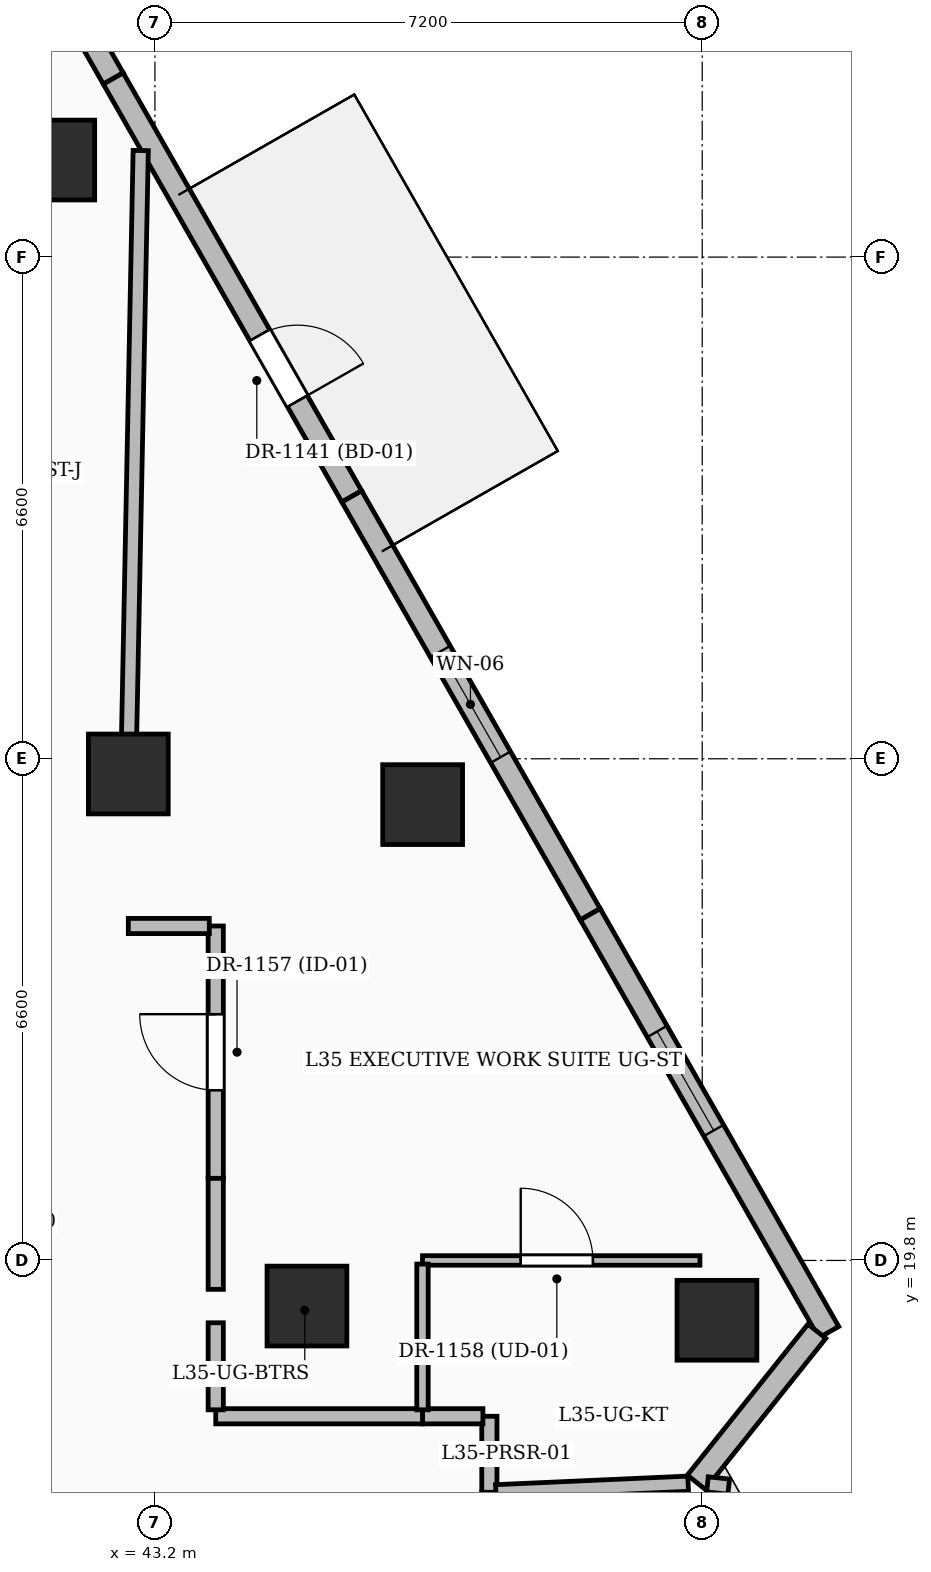
"""IFC4 building model, lengths in metres.
Left out: names, types, materials, properties, quantities, classifications, styles, units other than length and angle.
Written with IfcOpenShell. Run it as: python <this file> out.ifc"""

import sys

from ifc_helpers import new_model, si_unit, direction, frame, frame_2d, origin, origin_2d, place, context, subcontext, project, spatial, rectangle, extrude, element, fill, save


model = new_model("IFC4")
c1 = context("Model", 3, precision=1e-05, world=origin(), true_north=direction((0.0, 1.0)))
c2 = subcontext(c1, "Body", "Model", "MODEL_VIEW")
j1 = project(units=[si_unit("LENGTHUNIT", "METRE"), si_unit("PLANEANGLEUNIT", "RADIAN")], contexts=[c1])
p1 = place(None, origin())
s1 = spatial("IfcSite", under=j1, at=p1, CompositionType="ELEMENT")
p2 = place(p1, origin())
s2 = spatial("IfcBuilding", under=s1, at=p2, CompositionType="ELEMENT")
p3 = place(p2, frame((0.0, 0.0, 139.2)))
s3 = spatial("IfcBuildingStorey", under=s2, at=p3, CompositionType="ELEMENT", Elevation=139.2)
for number, where, z_axis, x_axis in (
    (1, (45.2, 19.2, 0.0), (0.0, 0.0, 1.0), (1.0, 0.0, 0.0)),
    (2, (42.85, 26.2, 0.0), (0.0, 0.0, 1.0), (1.0, 0.0, 0.0)),
    (3, (50.594, 19.013, 0.0), (0.0, 0.0, 1.0), (1.0, 0.0, 0.0)),
    (4, (46.722, 25.797, 0.0), (0.0, 0.0, 1.0), (1.0, 0.0, 0.0)),
    (5, (41.882, 34.277, 0.0), (0.0, 0.0, 1.0), (1.0, 0.0, 0.0)),
):
    element("IfcColumn", number, at=place(p3, frame(where, z_axis=z_axis, x_axis=x_axis)), inside=s3, PredefinedType="COLUMN", context=c2, shape_type="SweptSolid", body=[
        extrude(rectangle(XDim=1.05, YDim=1.05, at=origin_2d()), origin(), (0.0, 0.0, 1.0), 3.6),
    ])
p4 = place(p3, frame((39.801, 40.344, 0.0), z_axis=(0.0, 0.0, 1.0), x_axis=(0.495718237465, -0.868483407467, 0.0)))
e6 = element("IfcWall", 6, at=p4, inside=s3, PredefinedType="SOLIDWALL", context=c2, shape_type="SweptSolid", body=[
    extrude(rectangle(XDim=5.75, YDim=0.3, at=frame_2d((2.875, 0.0))), origin(), (0.0, 0.0, 1.0), 3.35),
])
p5 = place(p4, frame((2.52, 0.0, 0.55)))
e7 = element("IfcOpeningElement", 7, at=p5, cuts=e6, PredefinedType="OPENING", context=c2, shape_type="SweptSolid", body=[
    extrude(rectangle(XDim=2.1, YDim=2.4, at=frame_2d((1.05, 1.2))), frame((0.0, 0.16, 0.0), z_axis=(0.0, -1.0, 0.0), x_axis=(1.0, 0.0, 0.0)), (0.0, 0.0, 1.0), 0.32),
])
p6 = place(p3, frame((42.652, 35.35, 0.0), z_axis=(0.0, 0.0, 1.0), x_axis=(0.495702771017, -0.868492235317, 0.0)))
e8 = element("IfcWall", 8, at=p6, inside=s3, PredefinedType="SOLIDWALL", context=c2, shape_type="SweptSolid", body=[
    extrude(rectangle(XDim=6.33, YDim=0.3, at=frame_2d((3.165, 0.0))), origin(), (0.0, 0.0, 1.0), 3.35),
])
p7 = place(p6, frame((3.888, 0.0, 0.0)))
e9 = element("IfcOpeningElement", 9, at=p7, cuts=e8, PredefinedType="OPENING", context=c2, shape_type="SweptSolid", body=[
    extrude(rectangle(XDim=1.0, YDim=2.2, at=frame_2d((0.5, 1.1))), frame((0.0, 0.16, 0.0), z_axis=(0.0, -1.0, 0.0), x_axis=(1.0, 0.0, 0.0)), (0.0, 0.0, 1.0), 0.32),
])
p8 = place(p3, frame((45.79, 29.852, 0.0), z_axis=(0.0, 0.0, 1.0), x_axis=(0.495702771017, -0.868492235317, 0.0)))
e10 = element("IfcWall", 10, at=p8, inside=s3, PredefinedType="SOLIDWALL", context=c2, shape_type="SweptSolid", body=[
    extrude(rectangle(XDim=6.33, YDim=0.3, at=frame_2d((3.165, 0.0))), origin(), (0.0, 0.0, 1.0), 3.35),
])
p9 = place(p8, frame((2.35, 0.0, 0.55)))
e11 = element("IfcOpeningElement", 11, at=p9, cuts=e10, PredefinedType="OPENING", context=c2, shape_type="SweptSolid", body=[
    extrude(rectangle(XDim=1.6, YDim=2.2, at=frame_2d((0.8, 1.1))), frame((0.0, 0.16, 0.0), z_axis=(0.0, -1.0, 0.0), x_axis=(1.0, 0.0, 0.0)), (0.0, 0.0, 1.0), 0.32),
])
p10 = place(p3, frame((48.927, 24.354, 0.0), z_axis=(0.0, 0.0, 1.0), x_axis=(0.495702771017, -0.868492235317, 0.0)))
e12 = element("IfcWall", 12, at=p10, inside=s3, PredefinedType="SOLIDWALL", context=c2, shape_type="SweptSolid", body=[
    extrude(rectangle(XDim=6.33, YDim=0.3, at=frame_2d((3.165, 0.0))), origin(), (0.0, 0.0, 1.0), 3.35),
])
p11 = place(p10, frame((1.775, 0.0, 0.6)))
e13 = element("IfcOpeningElement", 13, at=p11, cuts=e12, PredefinedType="OPENING", context=c2, shape_type="SweptSolid", body=[
    extrude(rectangle(XDim=1.5, YDim=2.1, at=frame_2d((0.75, 1.05))), frame((0.0, 0.16, 0.0), z_axis=(0.0, -1.0, 0.0), x_axis=(1.0, 0.0, 0.0)), (0.0, 0.0, 1.0), 0.32),
])
p12 = place(p3, frame((51.909, 18.869, 0.0), z_axis=(0.0, 0.0, 1.0), x_axis=(-0.624062389724, -0.781374515666, 0.0)))
e14 = element("IfcWall", 14, at=p12, inside=s3, PredefinedType="SOLIDWALL", context=c2, shape_type="SweptSolid", body=[
    extrude(rectangle(XDim=2.542, YDim=0.3, at=frame_2d((1.271, 0.0))), origin(), (0.0, 0.0, 1.0), 2.575),
])
p13 = place(p3, frame((47.425, 14.2, 0.0), z_axis=(0.0, 0.0, 1.0), x_axis=(0.068484119878, 0.997652206595, 0.0)))
e15 = element("IfcWall", 15, at=p13, inside=s3, PredefinedType="PARTITIONING", context=c2, shape_type="SweptSolid", body=[
    extrude(rectangle(XDim=2.556, YDim=0.2, at=frame_2d((1.278, 0.0))), origin(), (0.0, 0.0, 1.0), 2.393),
])
p14 = place(p13, frame((1.172, 0.0, 0.0)))
e16 = element("IfcOpeningElement", 16, at=p14, cuts=e15, PredefinedType="OPENING", context=c2, shape_type="SweptSolid", body=[
    extrude(rectangle(XDim=0.9, YDim=2.1, at=frame_2d((0.45, 1.05))), frame((0.0, 0.11, 0.0), z_axis=(0.0, -1.0, 0.0), x_axis=(1.0, 0.0, 0.0)), (0.0, 0.0, 1.0), 0.22),
])
p15 = place(p3, frame((44.0, 20.88, 0.0), z_axis=(0.0, 0.0, 1.0), x_axis=(0.0, 1.0, 0.0)))
e17 = element("IfcWall", 17, at=p15, inside=s3, PredefinedType="PARTITIONING", context=c2, shape_type="SweptSolid", body=[
    extrude(rectangle(XDim=3.32, YDim=0.2, at=frame_2d((1.66, 0.0))), origin(), (0.0, 0.0, 1.0), 2.436),
])
p16 = place(p15, frame((1.16, 0.0, 0.0)))
e18 = element("IfcOpeningElement", 18, at=p16, cuts=e17, PredefinedType="OPENING", context=c2, shape_type="SweptSolid", body=[
    extrude(rectangle(XDim=1.0, YDim=2.2, at=frame_2d((0.5, 1.1))), frame((0.0, 0.11, 0.0), z_axis=(0.0, -1.0, 0.0), x_axis=(1.0, 0.0, 0.0)), (0.0, 0.0, 1.0), 0.22),
])
p17 = place(p3, frame((43.915, 24.2, 0.0), z_axis=(0.0, 0.0, 1.0), x_axis=(-1.0, 0.0, 0.0)))
e19 = element("IfcWall", 19, at=p17, inside=s3, PredefinedType="PARTITIONING", context=c2, shape_type="SweptSolid", body=[
    extrude(rectangle(XDim=1.065, YDim=0.2, at=frame_2d((0.532, 0.0))), origin(), (0.0, 0.0, 1.0), 2.436),
])
p18 = place(p3, frame((47.6, 16.75, 0.0), z_axis=(0.0, 0.0, 1.0), x_axis=(0.0, 1.0, 0.0)))
e20 = element("IfcWall", 20, at=p18, inside=s3, PredefinedType="PARTITIONING", context=c2, shape_type="SweptSolid", body=[
    extrude(rectangle(XDim=1.0, YDim=0.2, at=frame_2d((0.5, 0.0))), origin(), (0.0, 0.0, 1.0), 3.35),
])
p19 = place(p3, frame((47.515, 17.75, 0.0), z_axis=(0.0, 0.0, 1.0), x_axis=(-1.0, 0.0, 0.0)))
e21 = element("IfcWall", 21, at=p19, inside=s3, PredefinedType="PARTITIONING", context=c2, shape_type="SweptSolid", body=[
    extrude(rectangle(XDim=0.795, YDim=0.2, at=frame_2d((0.397, 0.0))), origin(), (0.0, 0.0, 1.0), 3.35),
])
p20 = place(p3, frame((46.72, 17.75, 0.0), z_axis=(0.0, 0.0, 1.0), x_axis=(-1.0, 0.0, 0.0)))
e22 = element("IfcWall", 22, at=p20, inside=s3, PredefinedType="PARTITIONING", context=c2, shape_type="SweptSolid", body=[
    extrude(rectangle(XDim=2.72, YDim=0.2, at=frame_2d((1.36, 0.0))), origin(), (0.0, 0.0, 1.0), 2.436),
])
p21 = place(p3, frame((44.0, 17.835, 0.0), z_axis=(0.0, 0.0, 1.0), x_axis=(0.0, 1.0, 0.0)))
e23 = element("IfcWall", 23, at=p21, inside=s3, PredefinedType="PARTITIONING", context=c2, shape_type="SweptSolid", body=[
    extrude(rectangle(XDim=1.145, YDim=0.2, at=frame_2d((0.573, 0.0))), origin(), (0.0, 0.0, 1.0), 3.35),
])
p22 = place(p3, frame((50.215, 16.863, 0.0), z_axis=(0.0, 0.0, 1.0), x_axis=(-0.999003421761, -0.04463365669, 0.0)))
e24 = element("IfcWall", 24, at=p22, inside=s3, PredefinedType="PARTITIONING", context=c2, shape_type="SweptSolid", body=[
    extrude(rectangle(XDim=2.532, YDim=0.2, at=frame_2d((1.266, 0.0))), origin(), (0.0, 0.0, 1.0), 2.393),
])
p23 = place(p3, frame((50.749, 16.824, 0.0), z_axis=(0.0, 0.0, 1.0), x_axis=(-0.994299311312, 0.106624947944, 0.0)))
e25 = element("IfcWall", 25, at=p23, inside=s3, PredefinedType="PARTITIONING", context=c2, shape_type="SweptSolid", body=[
    extrude(rectangle(XDim=0.282, YDim=0.2, at=frame_2d((0.141, 0.0))), origin(), (0.0, 0.0, 1.0), 3.35),
])
p24 = place(p3, frame((46.72, 19.8, 0.0), z_axis=(0.0, 0.0, 1.0), x_axis=(1.0, 0.0, 0.0)))
e26 = element("IfcWall", 26, at=p24, inside=s3, PredefinedType="PARTITIONING", context=c2, shape_type="SweptSolid", body=[
    extrude(rectangle(XDim=3.65, YDim=0.125, at=frame_2d((1.825, 0.0))), origin(), (0.0, 0.0, 1.0), 2.57),
])
p25 = place(p24, frame((1.292, 0.0, 0.0)))
e27 = element("IfcOpeningElement", 27, at=p25, cuts=e26, PredefinedType="OPENING", context=c2, shape_type="SweptSolid", body=[
    extrude(rectangle(XDim=0.95, YDim=2.2, at=frame_2d((0.475, 1.1))), frame((0.0, 0.072, 0.0), z_axis=(0.0, -1.0, 0.0), x_axis=(1.0, 0.0, 0.0)), (0.0, 0.0, 1.0), 0.145),
])
p26 = place(p3, frame((43.013, 34.402, 0.0), z_axis=(0.0, 0.0, 1.0), x_axis=(-0.019849642377, -0.99980297644, 0.0)))
e28 = element("IfcWall", 28, at=p26, inside=s3, PredefinedType="PARTITIONING", context=c2, shape_type="SweptSolid", body=[
    extrude(rectangle(XDim=8.204, YDim=0.2, at=frame_2d((4.102, 0.0))), origin(), (0.0, 0.0, 1.0), 2.393),
])
p27 = place(p3, frame((46.72, 19.752, 0.0), z_axis=(0.0, 0.0, 1.0), x_axis=(0.0, -1.0, 0.0)))
e29 = element("IfcWall", 29, at=p27, inside=s3, PredefinedType="PARTITIONING", context=c2, shape_type="SweptSolid", body=[
    extrude(rectangle(XDim=1.917, YDim=0.15, at=frame_2d((0.959, 0.0))), origin(), (0.0, 0.0, 1.0), 3.35),
])
p28 = place(p3, frame((44.0, 19.42, 0.0), z_axis=(0.0, 0.0, 1.0), x_axis=(0.0, 1.0, 0.0)))
e30 = element("IfcWall", 30, at=p28, inside=s3, PredefinedType="PARTITIONING", context=c2, shape_type="SweptSolid", body=[
    extrude(rectangle(XDim=1.46, YDim=0.2, at=frame_2d((0.73, 0.0))), origin(), (0.0, 0.0, 1.0), 3.35),
])
p29 = place(p7, origin())
e31 = element("IfcDoor", 31, at=p29, inside=s3, OperationType="SINGLE_SWING_RIGHT", PredefinedType="DOOR", context=c2, shape_type="SweptSolid", body=[
    extrude(rectangle(XDim=1.0, YDim=2.2, at=frame_2d((0.5, 1.1))), frame((0.0, 0.025, 0.0), z_axis=(0.0, -1.0, 0.0), x_axis=(1.0, 0.0, 0.0)), (0.0, 0.0, 1.0), 0.05),
])
fill(e9, e31)
p30 = place(p9, origin())
e32 = element("IfcWindow", 32, at=p30, inside=s3, PartitioningType="SINGLE_PANEL", PredefinedType="WINDOW", context=c2, shape_type="SweptSolid", body=[
    extrude(rectangle(XDim=1.6, YDim=2.2, at=frame_2d((0.8, 1.1))), frame((0.0, 0.03, 0.0), z_axis=(0.0, -1.0, 0.0), x_axis=(1.0, 0.0, 0.0)), (0.0, 0.0, 1.0), 0.06),
])
fill(e11, e32)
p31 = place(p11, origin())
e33 = element("IfcWindow", 33, at=p31, inside=s3, PartitioningType="SINGLE_PANEL", PredefinedType="WINDOW", context=c2, shape_type="SweptSolid", body=[
    extrude(rectangle(XDim=1.5, YDim=2.1, at=frame_2d((0.75, 1.05))), frame((0.0, 0.03, 0.0), z_axis=(0.0, -1.0, 0.0), x_axis=(1.0, 0.0, 0.0)), (0.0, 0.0, 1.0), 0.06),
])
fill(e13, e33)
p32 = place(p16, origin())
e34 = element("IfcDoor", 34, at=p32, inside=s3, OperationType="SINGLE_SWING_RIGHT", PredefinedType="DOOR", context=c2, shape_type="SweptSolid", body=[
    extrude(rectangle(XDim=1.0, YDim=2.2, at=frame_2d((0.5, 1.1))), frame((0.0, 0.025, 0.0), z_axis=(0.0, -1.0, 0.0), x_axis=(1.0, 0.0, 0.0)), (0.0, 0.0, 1.0), 0.05),
])
fill(e18, e34)
p33 = place(p25, origin())
e35 = element("IfcDoor", 35, at=p33, inside=s3, OperationType="SINGLE_SWING_LEFT", PredefinedType="DOOR", context=c2, shape_type="SweptSolid", body=[
    extrude(rectangle(XDim=0.95, YDim=2.2, at=frame_2d((0.475, 1.1))), frame((0.0, 0.025, 0.0), z_axis=(0.0, -1.0, 0.0), x_axis=(1.0, 0.0, 0.0)), (0.0, 0.0, 1.0), 0.05),
])
fill(e27, e35)
save(model, sys.argv[1])
